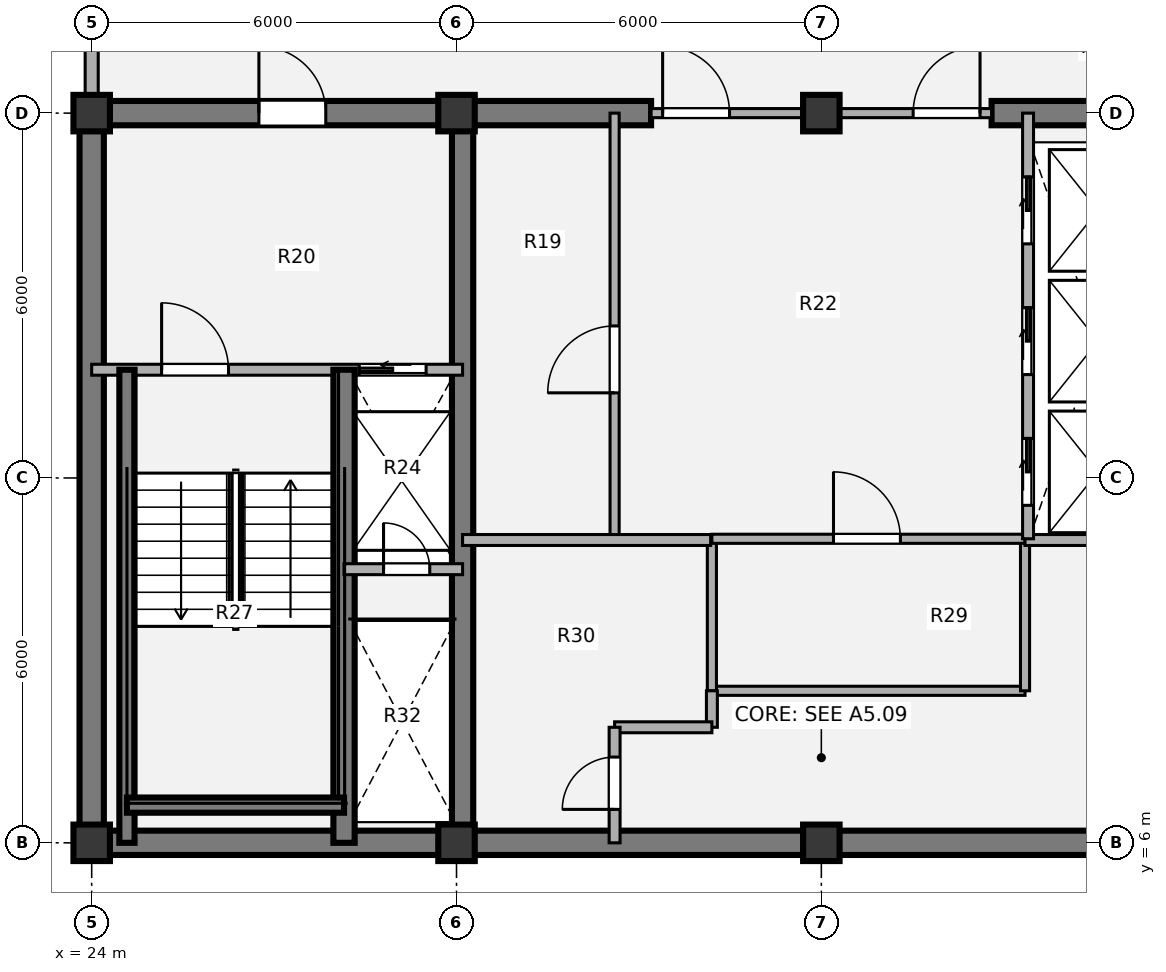
"""IFC4 building model, lengths in metres.
Left out: names, types, materials, properties, quantities, classifications, styles, units other than length and angle.
Written with IfcOpenShell. Run it as: python <this file> out.ifc"""

import sys

from ifc_helpers import new_model, si_unit, direction, frame, frame_2d, origin, origin_2d, place, context, subcontext, project, spatial, rectangle, extrude, source, transform, mapped, element, fill, save


model = new_model("IFC4")
c1 = context("Model", 3, precision=1e-05, world=origin(), true_north=direction((0.0, 1.0)))
c2 = subcontext(c1, "Body", "Model", "MODEL_VIEW")
j1 = project(units=[si_unit("LENGTHUNIT", "METRE"), si_unit("PLANEANGLEUNIT", "RADIAN")], contexts=[c1])
p1 = place(None, origin())
s1 = spatial("IfcSite", under=j1, at=p1, CompositionType="ELEMENT")
p2 = place(p1, origin())
s2 = spatial("IfcBuilding", under=s1, at=p2, CompositionType="ELEMENT")
p3 = place(p2, frame((0.0, 0.0, 249.48)))
s3 = spatial("IfcBuildingStorey", under=s2, at=p3, CompositionType="ELEMENT", Elevation=249.48)
m1 = source(origin(), c2, "Body", "SweptSolid", [
    extrude(rectangle(XDim=0.6, YDim=0.6, at=origin_2d()), origin(), (0.0, 0.0, 1.0), 3.78),
])
for number, where, z_axis, x_axis in (
    (1, (24.0, 6.0, 0.0), (0.0, 0.0, 1.0), (1.0, 0.0, 0.0)),
    (2, (30.0, 6.0, 0.0), (0.0, 0.0, 1.0), (1.0, 0.0, 0.0)),
    (3, (36.0, 6.0, 0.0), (0.0, 0.0, 1.0), (1.0, 0.0, 0.0)),
    (4, (24.0, 18.0, 0.0), (0.0, 0.0, 1.0), (1.0, 0.0, 0.0)),
    (5, (30.0, 18.0, 0.0), (0.0, 0.0, 1.0), (1.0, 0.0, 0.0)),
    (6, (36.0, 18.0, 0.0), (0.0, 0.0, 1.0), (1.0, 0.0, 0.0)),
):
    element("IfcColumn", number, at=place(p3, frame(where, z_axis=z_axis, x_axis=x_axis)), inside=s3, PredefinedType="COLUMN", context=c2, shape_type="MappedRepresentation", body=[
        mapped(m1, transform((0.0, 0.0, 0.0), x_axis=(1.0, 0.0, 0.0), y_axis=(0.0, 1.0, 0.0), z_axis=(0.0, 0.0, 1.0), scale=1.0)),
    ])
p4 = place(p3, frame((48.2, 6.0, 0.0), z_axis=(0.0, 0.0, 1.0), x_axis=(-1.0, 0.0, 0.0)))
e7 = element("IfcWall", 7, at=p4, inside=s3, PredefinedType="SHEAR", context=c2, shape_type="SweptSolid", body=[
    extrude(rectangle(XDim=24.4, YDim=0.4, at=frame_2d((12.2, 0.0))), origin(), (0.0, 0.0, 1.0), 3.78),
])
p5 = place(p3, frame((24.0, 6.0, 0.0), z_axis=(0.0, 0.0, 1.0), x_axis=(0.0, 1.0, 0.0)))
e8 = element("IfcWall", 8, at=p5, inside=s3, PredefinedType="SHEAR", context=c2, shape_type="SweptSolid", body=[
    extrude(rectangle(XDim=12.0, YDim=0.4, at=frame_2d((6.0, 0.0))), origin(), (0.0, 0.0, 1.0), 3.78),
])
p6 = place(p3, frame((23.8, 18.0, 0.0), z_axis=(0.0, 0.0, 1.0), x_axis=(1.0, 0.0, 0.0)))
e9 = element("IfcWall", 9, at=p6, inside=s3, PredefinedType="SHEAR", context=c2, shape_type="SweptSolid", body=[
    extrude(rectangle(XDim=9.4, YDim=0.4, at=frame_2d((4.7, 0.0))), origin(), (0.0, 0.0, 1.0), 3.78),
])
p7 = place(p6, frame((2.95, 0.0, 0.0)))
e10 = element("IfcOpeningElement", 10, at=p7, cuts=e9, PredefinedType="OPENING", context=c2, shape_type="SweptSolid", body=[
    extrude(rectangle(XDim=1.1, YDim=2.1, at=origin_2d()), frame((0.55, 0.21, 1.05), z_axis=(0.0, -1.0, 0.0), x_axis=(1.0, 0.0, 0.0)), (0.0, 0.0, 1.0), 0.42),
])
p8 = place(p3, frame((38.8, 18.0, 0.0), z_axis=(0.0, 0.0, 1.0), x_axis=(1.0, 0.0, 0.0)))
e11 = element("IfcWall", 11, at=p8, inside=s3, PredefinedType="SHEAR", context=c2, shape_type="SweptSolid", body=[
    extrude(rectangle(XDim=9.4, YDim=0.4, at=frame_2d((4.7, 0.0))), origin(), (0.0, 0.0, 1.0), 3.78),
])
p9 = place(p8, frame((5.45, 0.0, 0.0)))
e12 = element("IfcOpeningElement", 12, at=p9, cuts=e11, PredefinedType="OPENING", context=c2, shape_type="SweptSolid", body=[
    extrude(rectangle(XDim=1.1, YDim=2.1, at=origin_2d()), frame((0.55, 0.21, 1.05), z_axis=(0.0, -1.0, 0.0), x_axis=(1.0, 0.0, 0.0)), (0.0, 0.0, 1.0), 0.42),
])
p10 = place(p3, frame((30.1, 6.0, 0.0), z_axis=(0.0, 0.0, 1.0), x_axis=(0.0, 1.0, 0.0)))
e13 = element("IfcWall", 13, at=p10, inside=s3, PredefinedType="SHEAR", context=c2, shape_type="SweptSolid", body=[
    extrude(rectangle(XDim=12.0, YDim=0.35, at=frame_2d((6.0, 0.0))), origin(), (0.0, 0.0, 1.0), 3.78),
])
p11 = place(p3, frame((24.0, 18.28, 0.0), z_axis=(0.0, 0.0, 1.0), x_axis=(0.0, 1.0, 0.0)))
e14 = element("IfcWall", 14, at=p11, inside=s3, PredefinedType="SOLIDWALL", context=c2, shape_type="SweptSolid", body=[
    extrude(rectangle(XDim=2.77, YDim=0.215, at=frame_2d((1.385, 0.0))), origin(), (0.0, 0.0, 1.0), 2.718),
])
p12 = place(p3, frame((32.6, 11.0, 0.0), z_axis=(0.0, 0.0, 1.0), x_axis=(0.0, 1.0, 0.0)))
e15 = element("IfcWall", 15, at=p12, inside=s3, PredefinedType="PARTITIONING", context=c2, shape_type="SweptSolid", body=[
    extrude(rectangle(XDim=7.0, YDim=0.15, at=frame_2d((3.5, 0.0))), origin(), (0.0, 0.0, 1.0), 3.5),
])
p13 = place(p12, frame((2.4, 0.0, 0.0)))
e16 = element("IfcOpeningElement", 16, at=p13, cuts=e15, PredefinedType="OPENING", context=c2, shape_type="SweptSolid", body=[
    extrude(rectangle(XDim=1.1, YDim=2.1, at=origin_2d()), frame((0.55, 0.085, 1.05), z_axis=(0.0, -1.0, 0.0), x_axis=(1.0, 0.0, 0.0)), (0.0, 0.0, 1.0), 0.17),
])
p14 = place(p3, frame((34.2, 8.5, 0.0), z_axis=(0.0, 0.0, 1.0), x_axis=(1.0, 0.0, 0.0)))
e17 = element("IfcWall", 17, at=p14, inside=s3, PredefinedType="PARTITIONING", context=c2, shape_type="SweptSolid", body=[
    extrude(rectangle(XDim=5.15, YDim=0.15, at=frame_2d((2.575, 0.0))), origin(), (0.0, 0.0, 1.0), 3.5),
])
for number, where, z_axis, x_axis in (
    (18, (34.2, 8.5, 0.0), (0.0, 0.0, 1.0), (0.0, 1.0, 0.0)),
    (19, (39.35, 8.5, 0.0), (0.0, 0.0, 1.0), (0.0, 1.0, 0.0)),
):
    element("IfcWall", number, at=place(p3, frame(where, z_axis=z_axis, x_axis=x_axis)), inside=s3, PredefinedType="PARTITIONING", context=c2, shape_type="SweptSolid", body=[
        extrude(rectangle(XDim=2.5, YDim=0.15, at=frame_2d((1.25, 0.0))), origin(), (0.0, 0.0, 1.0), 3.5),
    ])
p15 = place(p3, frame((34.2, 11.0, 0.0), z_axis=(0.0, 0.0, 1.0), x_axis=(1.0, 0.0, 0.0)))
e20 = element("IfcWall", 20, at=p15, inside=s3, PredefinedType="PARTITIONING", context=c2, shape_type="SweptSolid", body=[
    extrude(rectangle(XDim=5.15, YDim=0.15, at=frame_2d((2.575, 0.0))), origin(), (0.0, 0.0, 1.0), 3.5),
])
p16 = place(p15, frame((2.0, 0.0, 0.0)))
e21 = element("IfcOpeningElement", 21, at=p16, cuts=e20, PredefinedType="OPENING", context=c2, shape_type="SweptSolid", body=[
    extrude(rectangle(XDim=1.1, YDim=2.1, at=origin_2d()), frame((0.55, 0.085, 1.05), z_axis=(0.0, -1.0, 0.0), x_axis=(1.0, 0.0, 0.0)), (0.0, 0.0, 1.0), 0.17),
])
p17 = place(p3, frame((30.1, 10.98, 0.0), z_axis=(0.0, 0.0, 1.0), x_axis=(1.0, 0.0, 0.0)))
e22 = element("IfcWall", 22, at=p17, inside=s3, PredefinedType="PARTITIONING", context=c2, shape_type="SweptSolid", body=[
    extrude(rectangle(XDim=4.08, YDim=0.18, at=frame_2d((2.04, 0.0))), origin(), (0.0, 0.0, 1.0), 3.5),
])
p18 = place(p3, frame((34.2, 7.9, 0.0), z_axis=(0.0, 0.0, 1.0), x_axis=(0.0, 1.0, 0.0)))
e23 = element("IfcWall", 23, at=p18, inside=s3, PredefinedType="PARTITIONING", context=c2, shape_type="SweptSolid", body=[
    extrude(rectangle(XDim=0.6, YDim=0.18, at=frame_2d((0.3, 0.0))), origin(), (0.0, 0.0, 1.0), 3.5),
])
p19 = place(p3, frame((32.6, 7.9, 0.0), z_axis=(0.0, 0.0, 1.0), x_axis=(1.0, 0.0, 0.0)))
e24 = element("IfcWall", 24, at=p19, inside=s3, PredefinedType="PARTITIONING", context=c2, shape_type="SweptSolid", body=[
    extrude(rectangle(XDim=1.6, YDim=0.18, at=frame_2d((0.8, 0.0))), origin(), (0.0, 0.0, 1.0), 3.5),
])
p20 = place(p3, frame((32.6, 6.0, 0.0), z_axis=(0.0, 0.0, 1.0), x_axis=(0.0, 1.0, 0.0)))
e25 = element("IfcWall", 25, at=p20, inside=s3, PredefinedType="PARTITIONING", context=c2, shape_type="SweptSolid", body=[
    extrude(rectangle(XDim=1.9, YDim=0.18, at=frame_2d((0.95, 0.0))), origin(), (0.0, 0.0, 1.0), 3.5),
])
p21 = place(p20, frame((0.55, 0.0, 0.0)))
e26 = element("IfcOpeningElement", 26, at=p21, cuts=e25, PredefinedType="OPENING", context=c2, shape_type="SweptSolid", body=[
    extrude(rectangle(XDim=0.86, YDim=2.1, at=origin_2d()), frame((0.43, 0.1, 1.05), z_axis=(0.0, -1.0, 0.0), x_axis=(1.0, 0.0, 0.0)), (0.0, 0.0, 1.0), 0.2),
])
p22 = place(p3, frame((39.35, 10.98, 0.0), z_axis=(0.0, 0.0, 1.0), x_axis=(1.0, 0.0, 0.0)))
e27 = element("IfcWall", 27, at=p22, inside=s3, PredefinedType="PARTITIONING", context=c2, shape_type="SweptSolid", body=[
    extrude(rectangle(XDim=2.55, YDim=0.18, at=frame_2d((1.275, 0.0))), origin(), (0.0, 0.0, 1.0), 3.5),
])
p23 = place(p3, frame((33.2, 18.0, 0.0), z_axis=(0.0, 0.0, 1.0), x_axis=(1.0, 0.0, 0.0)))
e28 = element("IfcWall", 28, at=p23, inside=s3, PredefinedType="PARTITIONING", context=c2, shape_type="SweptSolid", body=[
    extrude(rectangle(XDim=5.6, YDim=0.15, at=frame_2d((2.8, 0.0))), origin(), (0.0, 0.0, 1.0), 2.515),
])
p24 = place(p23, frame((0.19, 0.0, 0.0)))
e29 = element("IfcOpeningElement", 29, at=p24, cuts=e28, PredefinedType="OPENING", context=c2, shape_type="SweptSolid", body=[
    extrude(rectangle(XDim=1.1, YDim=2.1, at=origin_2d()), frame((0.55, 0.085, 1.05), z_axis=(0.0, -1.0, 0.0), x_axis=(1.0, 0.0, 0.0)), (0.0, 0.0, 1.0), 0.17),
])
p25 = place(p23, frame((4.31, 0.0, 0.0)))
e30 = element("IfcOpeningElement", 30, at=p25, cuts=e28, PredefinedType="OPENING", context=c2, shape_type="SweptSolid", body=[
    extrude(rectangle(XDim=1.1, YDim=2.1, at=origin_2d()), frame((0.55, 0.085, 1.05), z_axis=(0.0, -1.0, 0.0), x_axis=(1.0, 0.0, 0.0)), (0.0, 0.0, 1.0), 0.17),
])
p26 = place(p3, frame((24.0, 13.78, 0.0), z_axis=(0.0, 0.0, 1.0), x_axis=(1.0, 0.0, 0.0)))
e31 = element("IfcWall", 31, at=p26, inside=s3, PredefinedType="PARTITIONING", context=c2, shape_type="SweptSolid", body=[
    extrude(rectangle(XDim=6.1, YDim=0.18, at=frame_2d((3.05, 0.0))), origin(), (0.0, 0.0, 1.0), 3.5),
])
p27 = place(p26, frame((1.15, 0.0, 0.0)))
e32 = element("IfcOpeningElement", 32, at=p27, cuts=e31, PredefinedType="OPENING", context=c2, shape_type="SweptSolid", body=[
    extrude(rectangle(XDim=1.1, YDim=2.1, at=origin_2d()), frame((0.55, 0.1, 1.05), z_axis=(0.0, -1.0, 0.0), x_axis=(1.0, 0.0, 0.0)), (0.0, 0.0, 1.0), 0.2),
])
p28 = place(p26, frame((4.4, 0.0, 0.0)))
e33 = element("IfcOpeningElement", 33, at=p28, cuts=e31, PredefinedType="OPENING", context=c2, shape_type="SweptSolid", body=[
    extrude(rectangle(XDim=1.1, YDim=2.1, at=origin_2d()), frame((0.55, 0.1, 1.05), z_axis=(0.0, -1.0, 0.0), x_axis=(1.0, 0.0, 0.0)), (0.0, 0.0, 1.0), 0.2),
])
p29 = place(p3, frame((28.15, 6.0, 0.0), z_axis=(0.0, 0.0, 1.0), x_axis=(0.0, 1.0, 0.0)))
e34 = element("IfcWall", 34, at=p29, inside=s3, PredefinedType="SHEAR", context=c2, shape_type="SweptSolid", body=[
    extrude(rectangle(XDim=7.78, YDim=0.35, at=frame_2d((3.89, 0.0))), origin(), (0.0, 0.0, 1.0), 3.85),
])
p30 = place(p3, frame((24.58, 6.0, 0.0), z_axis=(0.0, 0.0, 1.0), x_axis=(0.0, 1.0, 0.0)))
e35 = element("IfcWall", 35, at=p30, inside=s3, PredefinedType="SHEAR", context=c2, shape_type="SweptSolid", body=[
    extrude(rectangle(XDim=7.78, YDim=0.25, at=frame_2d((3.89, 0.0))), origin(), (0.0, 0.0, 1.0), 3.85),
])
p31 = place(p3, frame((24.58, 6.62, 0.0), z_axis=(0.0, 0.0, 1.0), x_axis=(1.0, 0.0, 0.0)))
e36 = element("IfcWall", 36, at=p31, inside=s3, PredefinedType="SHEAR", context=c2, shape_type="SweptSolid", body=[
    extrude(rectangle(XDim=3.57, YDim=0.25, at=frame_2d((1.785, 0.0))), origin(), (0.0, 0.0, 1.0), 3.85),
])
p32 = place(p3, frame((28.15, 10.5, 0.0), z_axis=(0.0, 0.0, 1.0), x_axis=(1.0, 0.0, 0.0)))
e37 = element("IfcWall", 37, at=p32, inside=s3, PredefinedType="PARTITIONING", context=c2, shape_type="SweptSolid", body=[
    extrude(rectangle(XDim=1.95, YDim=0.18, at=frame_2d((0.975, 0.0))), origin(), (0.0, 0.0, 1.0), 3.5),
])
p33 = place(p32, frame((0.65, 0.0, 0.0)))
e38 = element("IfcOpeningElement", 38, at=p33, cuts=e37, PredefinedType="OPENING", context=c2, shape_type="SweptSolid", body=[
    extrude(rectangle(XDim=0.76, YDim=2.05, at=origin_2d()), frame((0.38, 0.1, 1.025), z_axis=(0.0, -1.0, 0.0), x_axis=(1.0, 0.0, 0.0)), (0.0, 0.0, 1.0), 0.2),
])
p34 = place(p3, frame((39.4, 11.0, 0.0), z_axis=(0.0, 0.0, 1.0), x_axis=(0.0, 1.0, 0.0)))
e39 = element("IfcWall", 39, at=p34, inside=s3, PredefinedType="PARTITIONING", context=c2, shape_type="SweptSolid", body=[
    extrude(rectangle(XDim=7.0, YDim=0.18, at=frame_2d((3.5, 0.0))), origin(), (0.0, 0.0, 1.0), 3.5),
])
p35 = place(p34, frame((0.55, 0.0, 0.0)))
e40 = element("IfcOpeningElement", 40, at=p35, cuts=e39, PredefinedType="OPENING", context=c2, shape_type="SweptSolid", body=[
    extrude(rectangle(XDim=1.1, YDim=2.1, at=origin_2d()), frame((0.55, 0.1, 1.05), z_axis=(0.0, -1.0, 0.0), x_axis=(1.0, 0.0, 0.0)), (0.0, 0.0, 1.0), 0.2),
])
p36 = place(p34, frame((2.7, 0.0, 0.0)))
e41 = element("IfcOpeningElement", 41, at=p36, cuts=e39, PredefinedType="OPENING", context=c2, shape_type="SweptSolid", body=[
    extrude(rectangle(XDim=1.1, YDim=2.1, at=origin_2d()), frame((0.55, 0.1, 1.05), z_axis=(0.0, -1.0, 0.0), x_axis=(1.0, 0.0, 0.0)), (0.0, 0.0, 1.0), 0.2),
])
p37 = place(p34, frame((4.85, 0.0, 0.0)))
e42 = element("IfcOpeningElement", 42, at=p37, cuts=e39, PredefinedType="OPENING", context=c2, shape_type="SweptSolid", body=[
    extrude(rectangle(XDim=1.1, YDim=2.1, at=origin_2d()), frame((0.55, 0.1, 1.05), z_axis=(0.0, -1.0, 0.0), x_axis=(1.0, 0.0, 0.0)), (0.0, 0.0, 1.0), 0.2),
])
m2 = source(origin(), c2, "Body", "SweptSolid", [
    extrude(rectangle(XDim=1.1, YDim=2.1, at=origin_2d()), frame((0.55, 0.025, 1.05), z_axis=(0.0, -1.0, 0.0), x_axis=(1.0, 0.0, 0.0)), (0.0, 0.0, 1.0), 0.05),
])
p38 = place(p13, origin())
e43 = element("IfcDoor", 43, at=p38, inside=s3, OperationType="SINGLE_SWING_LEFT", PredefinedType="DOOR", context=c2, shape_type="MappedRepresentation", body=[
    mapped(m2, transform((0.0, 0.0, 0.0), x_axis=(1.0, 0.0, 0.0), y_axis=(0.0, 1.0, 0.0), z_axis=(0.0, 0.0, 1.0), scale=1.0)),
])
fill(e16, e43)
p39 = place(p16, origin())
e44 = element("IfcDoor", 44, at=p39, inside=s3, OperationType="SINGLE_SWING_LEFT", PredefinedType="DOOR", context=c2, shape_type="MappedRepresentation", body=[
    mapped(m2, transform((0.0, 0.0, 0.0), x_axis=(1.0, 0.0, 0.0), y_axis=(0.0, 1.0, 0.0), z_axis=(0.0, 0.0, 1.0), scale=1.0)),
])
fill(e21, e44)
m3 = source(origin(), c2, "Body", "SweptSolid", [
    extrude(rectangle(XDim=0.86, YDim=2.1, at=origin_2d()), frame((0.43, 0.025, 1.05), z_axis=(0.0, -1.0, 0.0), x_axis=(1.0, 0.0, 0.0)), (0.0, 0.0, 1.0), 0.05),
])
p40 = place(p21, origin())
e45 = element("IfcDoor", 45, at=p40, inside=s3, OperationType="SINGLE_SWING_LEFT", PredefinedType="DOOR", context=c2, shape_type="MappedRepresentation", body=[
    mapped(m3, transform((0.0, 0.0, 0.0), x_axis=(1.0, 0.0, 0.0), y_axis=(0.0, 1.0, 0.0), z_axis=(0.0, 0.0, 1.0), scale=1.0)),
])
fill(e26, e45)
m4 = source(origin(), c2, "Body", "SweptSolid", [
    extrude(rectangle(XDim=1.1, YDim=2.1, at=origin_2d()), frame((0.55, 0.025, 1.05), z_axis=(0.0, -1.0, 0.0), x_axis=(1.0, 0.0, 0.0)), (0.0, 0.0, 1.0), 0.05),
])
p41 = place(p24, origin())
e46 = element("IfcDoor", 46, at=p41, inside=s3, OperationType="SINGLE_SWING_LEFT", PredefinedType="DOOR", context=c2, shape_type="MappedRepresentation", body=[
    mapped(m4, transform((0.0, 0.0, 0.0), x_axis=(1.0, 0.0, 0.0), y_axis=(0.0, 1.0, 0.0), z_axis=(0.0, 0.0, 1.0), scale=1.0)),
])
fill(e29, e46)
p42 = place(p25, origin())
e47 = element("IfcDoor", 47, at=p42, inside=s3, OperationType="SINGLE_SWING_RIGHT", PredefinedType="DOOR", context=c2, shape_type="MappedRepresentation", body=[
    mapped(m4, transform((0.0, 0.0, 0.0), x_axis=(1.0, 0.0, 0.0), y_axis=(0.0, 1.0, 0.0), z_axis=(0.0, 0.0, 1.0), scale=1.0)),
])
fill(e30, e47)
m5 = source(origin(), c2, "Body", "SweptSolid", [
    extrude(rectangle(XDim=1.1, YDim=2.1, at=origin_2d()), frame((0.55, 0.025, 1.05), z_axis=(0.0, -1.0, 0.0), x_axis=(1.0, 0.0, 0.0)), (0.0, 0.0, 1.0), 0.05),
])
p43 = place(p27, origin())
e48 = element("IfcDoor", 48, at=p43, inside=s3, OperationType="SINGLE_SWING_LEFT", PredefinedType="DOOR", context=c2, shape_type="MappedRepresentation", body=[
    mapped(m5, transform((0.0, 0.0, 0.0), x_axis=(1.0, 0.0, 0.0), y_axis=(0.0, 1.0, 0.0), z_axis=(0.0, 0.0, 1.0), scale=1.0)),
])
fill(e32, e48)
m6 = source(origin(), c2, "Body", "SweptSolid", [
    extrude(rectangle(XDim=1.1, YDim=2.1, at=origin_2d()), frame((0.55, 0.025, 1.05), z_axis=(0.0, -1.0, 0.0), x_axis=(1.0, 0.0, 0.0)), (0.0, 0.0, 1.0), 0.05),
])
p44 = place(p28, origin())
e49 = element("IfcDoor", 49, at=p44, inside=s3, OperationType="SLIDING_TO_LEFT", PredefinedType="DOOR", context=c2, shape_type="MappedRepresentation", body=[
    mapped(m6, transform((0.0, 0.0, 0.0), x_axis=(1.0, 0.0, 0.0), y_axis=(0.0, 1.0, 0.0), z_axis=(0.0, 0.0, 1.0), scale=1.0)),
])
fill(e33, e49)
m7 = source(origin(), c2, "Body", "SweptSolid", [
    extrude(rectangle(XDim=0.76, YDim=2.05, at=origin_2d()), frame((0.38, 0.025, 1.025), z_axis=(0.0, -1.0, 0.0), x_axis=(1.0, 0.0, 0.0)), (0.0, 0.0, 1.0), 0.05),
])
p45 = place(p33, origin())
e50 = element("IfcDoor", 50, at=p45, inside=s3, OperationType="SINGLE_SWING_LEFT", PredefinedType="DOOR", context=c2, shape_type="MappedRepresentation", body=[
    mapped(m7, transform((0.0, 0.0, 0.0), x_axis=(1.0, 0.0, 0.0), y_axis=(0.0, 1.0, 0.0), z_axis=(0.0, 0.0, 1.0), scale=1.0)),
])
fill(e38, e50)
p46 = place(p7, origin())
e51 = element("IfcDoor", 51, at=p46, inside=s3, OperationType="SINGLE_SWING_LEFT", PredefinedType="DOOR", context=c2, shape_type="MappedRepresentation", body=[
    mapped(m4, transform((0.0, 0.0, 0.0), x_axis=(1.0, 0.0, 0.0), y_axis=(0.0, 1.0, 0.0), z_axis=(0.0, 0.0, 1.0), scale=1.0)),
])
fill(e10, e51)
p47 = place(p35, origin())
e52 = element("IfcDoor", 52, at=p47, inside=s3, OperationType="SLIDING_TO_RIGHT", PredefinedType="DOOR", context=c2, shape_type="MappedRepresentation", body=[
    mapped(m6, transform((0.0, 0.0, 0.0), x_axis=(1.0, 0.0, 0.0), y_axis=(0.0, 1.0, 0.0), z_axis=(0.0, 0.0, 1.0), scale=1.0)),
])
fill(e40, e52)
p48 = place(p36, origin())
e53 = element("IfcDoor", 53, at=p48, inside=s3, OperationType="SLIDING_TO_RIGHT", PredefinedType="DOOR", context=c2, shape_type="MappedRepresentation", body=[
    mapped(m6, transform((0.0, 0.0, 0.0), x_axis=(1.0, 0.0, 0.0), y_axis=(0.0, 1.0, 0.0), z_axis=(0.0, 0.0, 1.0), scale=1.0)),
])
fill(e41, e53)
p49 = place(p37, origin())
e54 = element("IfcDoor", 54, at=p49, inside=s3, OperationType="SLIDING_TO_RIGHT", PredefinedType="DOOR", context=c2, shape_type="MappedRepresentation", body=[
    mapped(m6, transform((0.0, 0.0, 0.0), x_axis=(1.0, 0.0, 0.0), y_axis=(0.0, 1.0, 0.0), z_axis=(0.0, 0.0, 1.0), scale=1.0)),
])
fill(e42, e54)
save(model, sys.argv[1])
